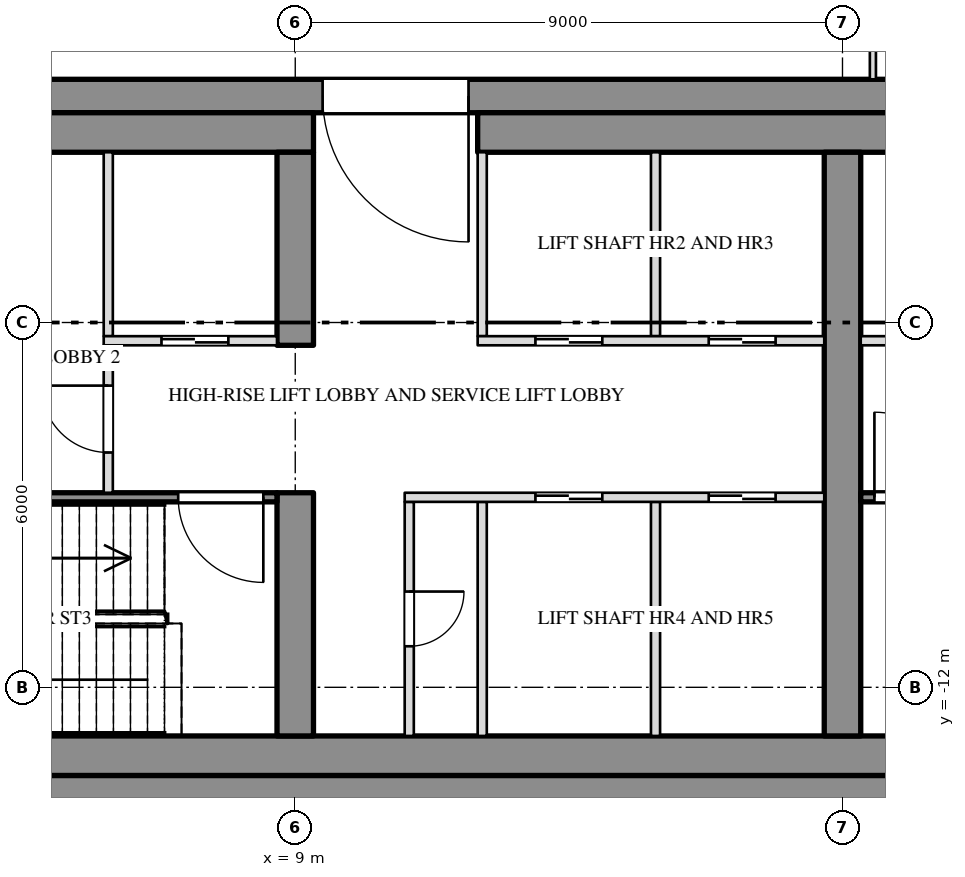
"""IFC4 building model, lengths in metres.
Left out: names, types, materials, properties, quantities, classifications, styles, units other than length and angle.
Written with IfcOpenShell. Run it as: python <this file> out.ifc"""

import sys

from ifc_helpers import new_model, si_unit, direction, frame, frame_2d, origin, place, context, subcontext, project, spatial, rectangle, extrude, element, fill, save


model = new_model("IFC4")
c1 = context("Model", 3, precision=1e-05, world=origin(), true_north=direction((0.0, 1.0)))
c2 = subcontext(c1, "Body", "Model", "MODEL_VIEW")
j1 = project(units=[si_unit("LENGTHUNIT", "METRE"), si_unit("PLANEANGLEUNIT", "RADIAN")], contexts=[c1])
p1 = place(None, origin())
s1 = spatial("IfcSite", under=j1, at=p1, CompositionType="ELEMENT")
p2 = place(p1, origin())
s2 = spatial("IfcBuilding", under=s1, at=p2, CompositionType="ELEMENT")
p3 = place(p2, frame((0.0, 0.0, 284.5)))
s3 = spatial("IfcBuildingStorey", under=s2, at=p3, CompositionType="ELEMENT", Elevation=284.5)
p4 = place(p3, frame((-27.0, -2.275, 0.0), z_axis=(0.0, 0.0, 1.0), x_axis=(1.0, 0.0, 0.0)))
e1 = element("IfcWall", 1, at=p4, inside=s3, PredefinedType="SHEAR", context=c2, shape_type="SweptSolid", body=[
    extrude(rectangle(XDim=54.0, YDim=0.55, at=frame_2d((27.0, 0.0))), origin(), (0.0, 0.0, 1.0), 3.78),
])
p5 = place(p4, frame((15.15, 0.0, 0.0)))
e2 = element("IfcOpeningElement", 2, at=p5, cuts=e1, PredefinedType="OPENING", context=c2, shape_type="SweptSolid", body=[
    extrude(rectangle(XDim=2.4, YDim=2.1, at=frame_2d((1.2, 1.05))), frame((0.0, 0.287, 0.0), z_axis=(0.0, -1.0, 0.0), x_axis=(1.0, 0.0, 0.0)), (0.0, 0.0, 1.0), 0.574),
])
p6 = place(p4, frame((36.45, 0.0, 0.0)))
e3 = element("IfcOpeningElement", 3, at=p6, cuts=e1, PredefinedType="OPENING", context=c2, shape_type="SweptSolid", body=[
    extrude(rectangle(XDim=2.4, YDim=2.1, at=frame_2d((1.2, 1.05))), frame((0.0, 0.287, 0.0), z_axis=(0.0, -1.0, 0.0), x_axis=(1.0, 0.0, 0.0)), (0.0, 0.0, 1.0), 0.574),
])
p7 = place(p3, frame((-27.0, -13.725, 0.0), z_axis=(0.0, 0.0, 1.0), x_axis=(1.0, 0.0, 0.0)))
e4 = element("IfcWall", 4, at=p7, inside=s3, PredefinedType="SHEAR", context=c2, shape_type="SweptSolid", body=[
    extrude(rectangle(XDim=54.0, YDim=0.55, at=frame_2d((27.0, 0.0))), origin(), (0.0, 0.0, 1.0), 3.78),
])
p8 = place(p3, frame((-9.3, -2.875, 0.0), z_axis=(0.0, 0.0, 1.0), x_axis=(1.0, 0.0, 0.0)))
e5 = element("IfcWall", 5, at=p8, inside=s3, PredefinedType="SHEAR", context=c2, shape_type="SweptSolid", body=[
    extrude(rectangle(XDim=18.6, YDim=0.65, at=frame_2d((9.3, 0.0))), origin(), (0.0, 0.0, 1.0), 3.78),
])
p9 = place(p3, frame((12.0, -2.875, 0.0), z_axis=(0.0, 0.0, 1.0), x_axis=(1.0, 0.0, 0.0)))
e6 = element("IfcWall", 6, at=p9, inside=s3, PredefinedType="SHEAR", context=c2, shape_type="SweptSolid", body=[
    extrude(rectangle(XDim=14.45, YDim=0.65, at=frame_2d((7.225, 0.0))), origin(), (0.0, 0.0, 1.0), 3.78),
])
p10 = place(p3, frame((-26.45, -13.125, 0.0), z_axis=(0.0, 0.0, 1.0), x_axis=(1.0, 0.0, 0.0)))
e7 = element("IfcWall", 7, at=p10, inside=s3, PredefinedType="SHEAR", context=c2, shape_type="SweptSolid", body=[
    extrude(rectangle(XDim=52.9, YDim=0.65, at=frame_2d((26.45, 0.0))), origin(), (0.0, 0.0, 1.0), 3.78),
])
p11 = place(p3, frame((9.0, -12.8, 0.0), z_axis=(0.0, 0.0, 1.0), x_axis=(0.0, 1.0, 0.0)))
e8 = element("IfcWall", 8, at=p11, inside=s3, PredefinedType="SHEAR", context=c2, shape_type="SweptSolid", body=[
    extrude(rectangle(XDim=4.0, YDim=0.6, at=frame_2d((2.0, 0.0))), origin(), (0.0, 0.0, 1.0), 3.78),
])
p12 = place(p3, frame((9.0, -6.375, 0.0), z_axis=(0.0, 0.0, 1.0), x_axis=(0.0, 1.0, 0.0)))
e9 = element("IfcWall", 9, at=p12, inside=s3, PredefinedType="SHEAR", context=c2, shape_type="SweptSolid", body=[
    extrude(rectangle(XDim=3.175, YDim=0.6, at=frame_2d((1.587, 0.0))), origin(), (0.0, 0.0, 1.0), 3.78),
])
p13 = place(p3, frame((18.0, -12.8, 0.0), z_axis=(0.0, 0.0, 1.0), x_axis=(0.0, 1.0, 0.0)))
e10 = element("IfcWall", 10, at=p13, inside=s3, PredefinedType="SHEAR", context=c2, shape_type="SweptSolid", body=[
    extrude(rectangle(XDim=9.6, YDim=0.6, at=frame_2d((4.8, 0.0))), origin(), (0.0, 0.0, 1.0), 3.78),
])
p14 = place(p3, frame((18.5, -2.0, 0.0), z_axis=(0.0, 0.0, 1.0), x_axis=(0.0, 1.0, 0.0)))
e11 = element("IfcWall", 11, at=p14, inside=s3, PredefinedType="PARTITIONING", context=c2, shape_type="SweptSolid", body=[
    extrude(rectangle(XDim=8.58, YDim=0.1, at=frame_2d((4.29, 0.0))), origin(), (0.0, 0.0, 1.0), 3.78),
])
p15 = place(p14, frame((3.8, 0.0, 0.0)))
e12 = element("IfcOpeningElement", 12, at=p15, cuts=e11, PredefinedType="OPENING", context=c2, shape_type="SweptSolid", body=[
    extrude(rectangle(XDim=1.0, YDim=2.1, at=frame_2d((0.5, 1.05))), frame((0.0, 0.062, 0.0), z_axis=(0.0, -1.0, 0.0), x_axis=(1.0, 0.0, 0.0)), (0.0, 0.0, 1.0), 0.124),
])
for number, where, z_axis, x_axis in (
    (13, (5.925, -6.225, 0.0), (0.0, 0.0, 1.0), (0.0, 1.0, 0.0)),
    (14, (12.075, -6.225, 0.0), (0.0, 0.0, 1.0), (0.0, 1.0, 0.0)),
    (15, (14.925, -6.225, 0.0), (0.0, 0.0, 1.0), (0.0, 1.0, 0.0)),
):
    element("IfcWall", number, at=place(p3, frame(where, z_axis=z_axis, x_axis=x_axis)), inside=s3, PredefinedType="PARTITIONING", context=c2, shape_type="SweptSolid", body=[
        extrude(rectangle(XDim=3.025, YDim=0.15, at=frame_2d((1.513, 0.0))), origin(), (0.0, 0.0, 1.0), 3.78),
    ])
p16 = place(p3, frame((10.875, -12.8, 0.0), z_axis=(0.0, 0.0, 1.0), x_axis=(0.0, 1.0, 0.0)))
e16 = element("IfcWall", 16, at=p16, inside=s3, PredefinedType="PARTITIONING", context=c2, shape_type="SweptSolid", body=[
    extrude(rectangle(XDim=3.85, YDim=0.15, at=frame_2d((1.925, 0.0))), origin(), (0.0, 0.0, 1.0), 3.78),
])
p17 = place(p16, frame((1.475, 0.0, 0.0)))
e17 = element("IfcOpeningElement", 17, at=p17, cuts=e16, PredefinedType="OPENING", context=c2, shape_type="SweptSolid", body=[
    extrude(rectangle(XDim=0.9, YDim=2.1, at=frame_2d((0.45, 1.05))), frame((0.0, 0.087, 0.0), z_axis=(0.0, -1.0, 0.0), x_axis=(1.0, 0.0, 0.0)), (0.0, 0.0, 1.0), 0.174),
])
for number, where, z_axis, x_axis in (
    (18, (12.075, -12.8, 0.0), (0.0, 0.0, 1.0), (0.0, 1.0, 0.0)),
    (19, (14.925, -12.8, 0.0), (0.0, 0.0, 1.0), (0.0, 1.0, 0.0)),
):
    element("IfcWall", number, at=place(p3, frame(where, z_axis=z_axis, x_axis=x_axis)), inside=s3, PredefinedType="PARTITIONING", context=c2, shape_type="SweptSolid", body=[
        extrude(rectangle(XDim=3.85, YDim=0.15, at=frame_2d((1.925, 0.0))), origin(), (0.0, 0.0, 1.0), 3.78),
    ])
p18 = place(p3, frame((5.925, -8.8, 0.0), z_axis=(0.0, 0.0, 1.0), x_axis=(0.0, 1.0, 0.0)))
e20 = element("IfcWall", 20, at=p18, inside=s3, PredefinedType="PARTITIONING", context=c2, shape_type="SweptSolid", body=[
    extrude(rectangle(XDim=2.425, YDim=0.15, at=frame_2d((1.212, 0.0))), origin(), (0.0, 0.0, 1.0), 3.78),
])
p19 = place(p18, frame((0.662, 0.0, 0.0)))
e21 = element("IfcOpeningElement", 21, at=p19, cuts=e20, PredefinedType="OPENING", context=c2, shape_type="SweptSolid", body=[
    extrude(rectangle(XDim=1.1, YDim=2.1, at=frame_2d((0.55, 1.05))), frame((0.0, 0.087, 0.0), z_axis=(0.0, -1.0, 0.0), x_axis=(1.0, 0.0, 0.0)), (0.0, 0.0, 1.0), 0.174),
])
p20 = place(p3, frame((5.85, -6.3, 0.0), z_axis=(0.0, 0.0, 1.0), x_axis=(1.0, 0.0, 0.0)))
e22 = element("IfcWall", 22, at=p20, inside=s3, PredefinedType="PARTITIONING", context=c2, shape_type="SweptSolid", body=[
    extrude(rectangle(XDim=2.85, YDim=0.15, at=frame_2d((1.425, 0.0))), origin(), (0.0, 0.0, 1.0), 3.78),
])
p21 = place(p20, frame((0.95, 0.0, 0.0)))
e23 = element("IfcOpeningElement", 23, at=p21, cuts=e22, PredefinedType="OPENING", context=c2, shape_type="SweptSolid", body=[
    extrude(rectangle(XDim=1.1, YDim=2.1, at=frame_2d((0.55, 1.05))), frame((0.0, 0.087, 0.0), z_axis=(0.0, -1.0, 0.0), x_axis=(1.0, 0.0, 0.0)), (0.0, 0.0, 1.0), 0.174),
])
p22 = place(p3, frame((12.0, -6.3, 0.0), z_axis=(0.0, 0.0, 1.0), x_axis=(1.0, 0.0, 0.0)))
e24 = element("IfcWall", 24, at=p22, inside=s3, PredefinedType="PARTITIONING", context=c2, shape_type="SweptSolid", body=[
    extrude(rectangle(XDim=5.7, YDim=0.15, at=frame_2d((2.85, 0.0))), origin(), (0.0, 0.0, 1.0), 3.78),
])
p23 = place(p22, frame((0.95, 0.0, 0.0)))
e25 = element("IfcOpeningElement", 25, at=p23, cuts=e24, PredefinedType="OPENING", context=c2, shape_type="SweptSolid", body=[
    extrude(rectangle(XDim=1.1, YDim=2.1, at=frame_2d((0.55, 1.05))), frame((0.0, 0.087, 0.0), z_axis=(0.0, -1.0, 0.0), x_axis=(1.0, 0.0, 0.0)), (0.0, 0.0, 1.0), 0.174),
])
p24 = place(p22, frame((3.8, 0.0, 0.0)))
e26 = element("IfcOpeningElement", 26, at=p24, cuts=e24, PredefinedType="OPENING", context=c2, shape_type="SweptSolid", body=[
    extrude(rectangle(XDim=1.1, YDim=2.1, at=frame_2d((0.55, 1.05))), frame((0.0, 0.087, 0.0), z_axis=(0.0, -1.0, 0.0), x_axis=(1.0, 0.0, 0.0)), (0.0, 0.0, 1.0), 0.174),
])
p25 = place(p3, frame((18.3, -6.3, 0.0), z_axis=(0.0, 0.0, 1.0), x_axis=(1.0, 0.0, 0.0)))
e27 = element("IfcWall", 27, at=p25, inside=s3, PredefinedType="PARTITIONING", context=c2, shape_type="SweptSolid", body=[
    extrude(rectangle(XDim=7.5, YDim=0.15, at=frame_2d((3.75, 0.0))), origin(), (0.0, 0.0, 1.0), 3.78),
])
p26 = place(p25, frame((0.7, 0.0, 0.0)))
e28 = element("IfcOpeningElement", 28, at=p26, cuts=e27, PredefinedType="OPENING", context=c2, shape_type="SweptSolid", body=[
    extrude(rectangle(XDim=1.0, YDim=2.1, at=frame_2d((0.5, 1.05))), frame((0.0, 0.087, 0.0), z_axis=(0.0, -1.0, 0.0), x_axis=(1.0, 0.0, 0.0)), (0.0, 0.0, 1.0), 0.174),
])
p27 = place(p25, frame((3.25, 0.0, 0.0)))
e29 = element("IfcOpeningElement", 29, at=p27, cuts=e27, PredefinedType="OPENING", context=c2, shape_type="SweptSolid", body=[
    extrude(rectangle(XDim=1.0, YDim=2.1, at=frame_2d((0.5, 1.05))), frame((0.0, 0.087, 0.0), z_axis=(0.0, -1.0, 0.0), x_axis=(1.0, 0.0, 0.0)), (0.0, 0.0, 1.0), 0.174),
])
p28 = place(p25, frame((5.75, 0.0, 0.0)))
e30 = element("IfcOpeningElement", 30, at=p28, cuts=e27, PredefinedType="OPENING", context=c2, shape_type="SweptSolid", body=[
    extrude(rectangle(XDim=1.1, YDim=2.1, at=frame_2d((0.55, 1.05))), frame((0.0, 0.087, 0.0), z_axis=(0.0, -1.0, 0.0), x_axis=(1.0, 0.0, 0.0)), (0.0, 0.0, 1.0), 0.174),
])
p29 = place(p3, frame((0.3, -8.875, 0.0), z_axis=(0.0, 0.0, 1.0), x_axis=(1.0, 0.0, 0.0)))
e31 = element("IfcWall", 31, at=p29, inside=s3, PredefinedType="SHEAR", context=c2, shape_type="SweptSolid", body=[
    extrude(rectangle(XDim=8.4, YDim=0.15, at=frame_2d((4.2, 0.0))), origin(), (0.0, 0.0, 1.0), 3.78),
])
p30 = place(p29, frame((6.775, 0.0, 0.0)))
e32 = element("IfcOpeningElement", 32, at=p30, cuts=e31, PredefinedType="OPENING", context=c2, shape_type="SweptSolid", body=[
    extrude(rectangle(XDim=1.4, YDim=2.1, at=frame_2d((0.7, 1.05))), frame((0.0, 0.087, 0.0), z_axis=(0.0, -1.0, 0.0), x_axis=(1.0, 0.0, 0.0)), (0.0, 0.0, 1.0), 0.174),
])
p31 = place(p3, frame((10.8, -8.875, 0.0), z_axis=(0.0, 0.0, 1.0), x_axis=(1.0, 0.0, 0.0)))
e33 = element("IfcWall", 33, at=p31, inside=s3, PredefinedType="PARTITIONING", context=c2, shape_type="SweptSolid", body=[
    extrude(rectangle(XDim=6.9, YDim=0.15, at=frame_2d((3.45, 0.0))), origin(), (0.0, 0.0, 1.0), 3.78),
])
p32 = place(p31, frame((2.15, 0.0, 0.0)))
e34 = element("IfcOpeningElement", 34, at=p32, cuts=e33, PredefinedType="OPENING", context=c2, shape_type="SweptSolid", body=[
    extrude(rectangle(XDim=1.1, YDim=2.1, at=frame_2d((0.55, 1.05))), frame((0.0, 0.087, 0.0), z_axis=(0.0, -1.0, 0.0), x_axis=(1.0, 0.0, 0.0)), (0.0, 0.0, 1.0), 0.174),
])
p33 = place(p31, frame((5.0, 0.0, 0.0)))
e35 = element("IfcOpeningElement", 35, at=p33, cuts=e33, PredefinedType="OPENING", context=c2, shape_type="SweptSolid", body=[
    extrude(rectangle(XDim=1.1, YDim=2.1, at=frame_2d((0.55, 1.05))), frame((0.0, 0.087, 0.0), z_axis=(0.0, -1.0, 0.0), x_axis=(1.0, 0.0, 0.0)), (0.0, 0.0, 1.0), 0.174),
])
p34 = place(p3, frame((18.3, -8.875, 0.0), z_axis=(0.0, 0.0, 1.0), x_axis=(1.0, 0.0, 0.0)))
e36 = element("IfcWall", 36, at=p34, inside=s3, PredefinedType="SHEAR", context=c2, shape_type="SweptSolid", body=[
    extrude(rectangle(XDim=7.5, YDim=0.15, at=frame_2d((3.75, 0.0))), origin(), (0.0, 0.0, 1.0), 3.78),
])
p35 = place(p34, frame((0.225, 0.0, 0.0)))
e37 = element("IfcOpeningElement", 37, at=p35, cuts=e36, PredefinedType="OPENING", context=c2, shape_type="SweptSolid", body=[
    extrude(rectangle(XDim=1.4, YDim=2.1, at=frame_2d((0.7, 1.05))), frame((0.0, 0.087, 0.0), z_axis=(0.0, -1.0, 0.0), x_axis=(1.0, 0.0, 0.0)), (0.0, 0.0, 1.0), 0.174),
])
p36 = place(p19, origin())
e38 = element("IfcDoor", 38, at=p36, inside=s3, OperationType="SINGLE_SWING_RIGHT", PredefinedType="DOOR", context=c2, shape_type="SweptSolid", body=[
    extrude(rectangle(XDim=1.1, YDim=2.1, at=frame_2d((0.55, 1.05))), frame((0.0, 0.025, 0.0), z_axis=(0.0, -1.0, 0.0), x_axis=(1.0, 0.0, 0.0)), (0.0, 0.0, 1.0), 0.05),
])
fill(e21, e38)
p37 = place(p21, origin())
e39 = element("IfcDoor", 39, at=p37, inside=s3, OperationType="SLIDING_TO_RIGHT", PredefinedType="DOOR", context=c2, shape_type="SweptSolid", body=[
    extrude(rectangle(XDim=1.1, YDim=2.1, at=frame_2d((0.55, 1.05))), frame((0.0, 0.025, 0.0), z_axis=(0.0, -1.0, 0.0), x_axis=(1.0, 0.0, 0.0)), (0.0, 0.0, 1.0), 0.05),
])
fill(e23, e39)
p38 = place(p30, origin())
e40 = element("IfcDoor", 40, at=p38, inside=s3, OperationType="DOUBLE_DOOR_SINGLE_SWING", PredefinedType="DOOR", context=c2, shape_type="SweptSolid", body=[
    extrude(rectangle(XDim=1.4, YDim=2.1, at=frame_2d((0.7, 1.05))), frame((0.0, 0.025, 0.0), z_axis=(0.0, -1.0, 0.0), x_axis=(1.0, 0.0, 0.0)), (0.0, 0.0, 1.0), 0.05),
])
fill(e32, e40)
p39 = place(p6, origin())
e41 = element("IfcDoor", 41, at=p39, inside=s3, OperationType="DOUBLE_DOOR_SINGLE_SWING", PredefinedType="DOOR", context=c2, shape_type="SweptSolid", body=[
    extrude(rectangle(XDim=2.4, YDim=2.1, at=frame_2d((1.2, 1.05))), frame((0.0, 0.025, 0.0), z_axis=(0.0, -1.0, 0.0), x_axis=(1.0, 0.0, 0.0)), (0.0, 0.0, 1.0), 0.05),
])
fill(e3, e41)
p40 = place(p17, origin())
e42 = element("IfcDoor", 42, at=p40, inside=s3, OperationType="SINGLE_SWING_LEFT", PredefinedType="DOOR", context=c2, shape_type="SweptSolid", body=[
    extrude(rectangle(XDim=0.9, YDim=2.1, at=frame_2d((0.45, 1.05))), frame((0.0, 0.025, 0.0), z_axis=(0.0, -1.0, 0.0), x_axis=(1.0, 0.0, 0.0)), (0.0, 0.0, 1.0), 0.05),
])
fill(e17, e42)
p41 = place(p32, origin())
e43 = element("IfcDoor", 43, at=p41, inside=s3, OperationType="SLIDING_TO_RIGHT", PredefinedType="DOOR", context=c2, shape_type="SweptSolid", body=[
    extrude(rectangle(XDim=1.1, YDim=2.1, at=frame_2d((0.55, 1.05))), frame((0.0, 0.025, 0.0), z_axis=(0.0, -1.0, 0.0), x_axis=(1.0, 0.0, 0.0)), (0.0, 0.0, 1.0), 0.05),
])
fill(e34, e43)
p42 = place(p23, origin())
e44 = element("IfcDoor", 44, at=p42, inside=s3, OperationType="SLIDING_TO_LEFT", PredefinedType="DOOR", context=c2, shape_type="SweptSolid", body=[
    extrude(rectangle(XDim=1.1, YDim=2.1, at=frame_2d((0.55, 1.05))), frame((0.0, 0.025, 0.0), z_axis=(0.0, -1.0, 0.0), x_axis=(1.0, 0.0, 0.0)), (0.0, 0.0, 1.0), 0.05),
])
fill(e25, e44)
p43 = place(p33, origin())
e45 = element("IfcDoor", 45, at=p43, inside=s3, OperationType="SLIDING_TO_RIGHT", PredefinedType="DOOR", context=c2, shape_type="SweptSolid", body=[
    extrude(rectangle(XDim=1.1, YDim=2.1, at=frame_2d((0.55, 1.05))), frame((0.0, 0.025, 0.0), z_axis=(0.0, -1.0, 0.0), x_axis=(1.0, 0.0, 0.0)), (0.0, 0.0, 1.0), 0.05),
])
fill(e35, e45)
p44 = place(p24, origin())
e46 = element("IfcDoor", 46, at=p44, inside=s3, OperationType="SLIDING_TO_LEFT", PredefinedType="DOOR", context=c2, shape_type="SweptSolid", body=[
    extrude(rectangle(XDim=1.1, YDim=2.1, at=frame_2d((0.55, 1.05))), frame((0.0, 0.025, 0.0), z_axis=(0.0, -1.0, 0.0), x_axis=(1.0, 0.0, 0.0)), (0.0, 0.0, 1.0), 0.05),
])
fill(e26, e46)
p45 = place(p35, origin())
e47 = element("IfcDoor", 47, at=p45, inside=s3, OperationType="DOUBLE_DOOR_SINGLE_SWING", PredefinedType="DOOR", context=c2, shape_type="SweptSolid", body=[
    extrude(rectangle(XDim=1.4, YDim=2.1, at=frame_2d((0.7, 1.05))), frame((0.0, 0.025, 0.0), z_axis=(0.0, -1.0, 0.0), x_axis=(1.0, 0.0, 0.0)), (0.0, 0.0, 1.0), 0.05),
])
fill(e37, e47)
save(model, sys.argv[1])
